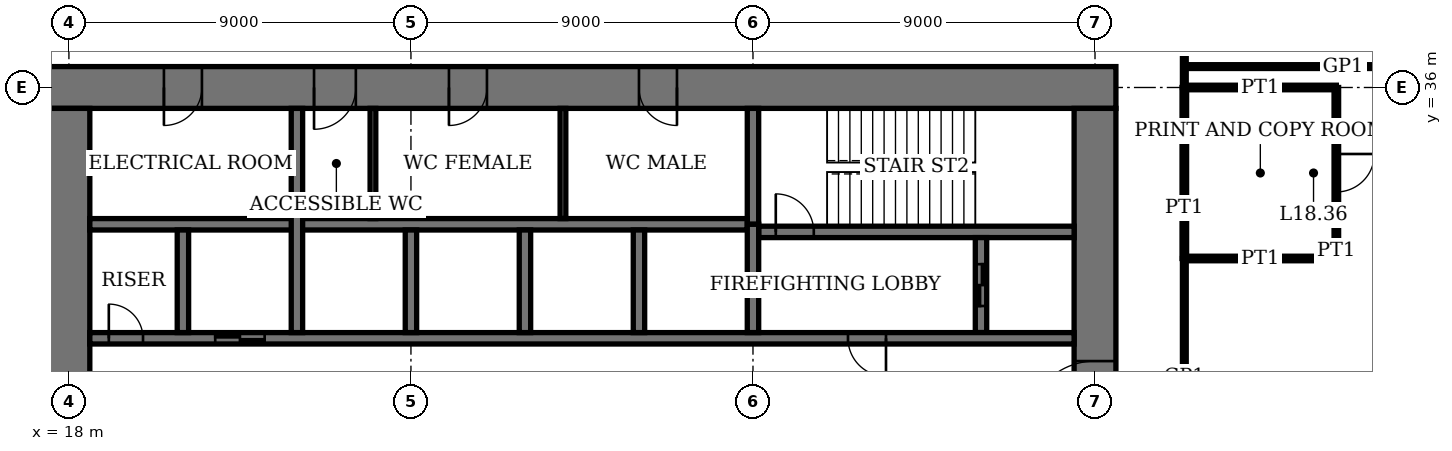
"""IFC4 building model, lengths in metres.
Left out: names, types, materials, properties, quantities, classifications, styles, units other than length and angle.
Written with IfcOpenShell. Run it as: python <this file> out.ifc"""

import sys

from ifc_helpers import new_model, si_unit, direction, frame, frame_2d, origin, place, context, subcontext, project, spatial, rectangle, extrude, element, fill, save


model = new_model("IFC4")
c1 = context("Model", 3, precision=1e-05, world=origin(), true_north=direction((0.0, 1.0)))
c2 = subcontext(c1, "Body", "Model", "MODEL_VIEW")
j1 = project(units=[si_unit("LENGTHUNIT", "METRE"), si_unit("PLANEANGLEUNIT", "RADIAN")], contexts=[c1])
p1 = place(None, origin())
s1 = spatial("IfcSite", under=j1, at=p1, CompositionType="ELEMENT")
p2 = place(p1, origin())
s2 = spatial("IfcBuilding", under=s1, at=p2, CompositionType="ELEMENT")
p3 = place(p2, frame((0.0, 0.0, 75.8)))
s3 = spatial("IfcBuildingStorey", under=s2, at=p3, CompositionType="ELEMENT", Elevation=75.8)
p4 = place(p3, frame((45.55, 36.0, 0.0), z_axis=(0.0, 0.0, 1.0), x_axis=(-1.0, 0.0, 0.0)))
e1 = element("IfcWall", 1, at=p4, inside=s3, PredefinedType="SHEAR", context=c2, shape_type="SweptSolid", body=[
    extrude(rectangle(XDim=28.1, YDim=1.1, at=frame_2d((14.05, 0.0))), origin(), (0.0, 0.0, 1.0), 4.2),
])
p5 = place(p4, frame((11.55, 0.0, 0.0)))
e2 = element("IfcOpeningElement", 2, at=p5, cuts=e1, PredefinedType="OPENING", context=c2, shape_type="SweptSolid", body=[
    extrude(rectangle(XDim=1.0, YDim=2.4, at=frame_2d((0.5, 1.2))), frame((0.0, 0.56, 0.0), z_axis=(0.0, -1.0, 0.0), x_axis=(1.0, 0.0, 0.0)), (0.0, 0.0, 1.0), 1.12),
])
p6 = place(p4, frame((16.55, 0.0, 0.0)))
e3 = element("IfcOpeningElement", 3, at=p6, cuts=e1, PredefinedType="OPENING", context=c2, shape_type="SweptSolid", body=[
    extrude(rectangle(XDim=1.0, YDim=2.4, at=frame_2d((0.5, 1.2))), frame((0.0, 0.56, 0.0), z_axis=(0.0, -1.0, 0.0), x_axis=(1.0, 0.0, 0.0)), (0.0, 0.0, 1.0), 1.12),
])
p7 = place(p4, frame((20.0, 0.0, 0.0)))
e4 = element("IfcOpeningElement", 4, at=p7, cuts=e1, PredefinedType="OPENING", context=c2, shape_type="SweptSolid", body=[
    extrude(rectangle(XDim=1.1, YDim=2.4, at=frame_2d((0.55, 1.2))), frame((0.0, 0.56, 0.0), z_axis=(0.0, -1.0, 0.0), x_axis=(1.0, 0.0, 0.0)), (0.0, 0.0, 1.0), 1.12),
])
p8 = place(p4, frame((24.05, 0.0, 0.0)))
e5 = element("IfcOpeningElement", 5, at=p8, cuts=e1, PredefinedType="OPENING", context=c2, shape_type="SweptSolid", body=[
    extrude(rectangle(XDim=1.0, YDim=2.4, at=frame_2d((0.5, 1.2))), frame((0.0, 0.56, 0.0), z_axis=(0.0, -1.0, 0.0), x_axis=(1.0, 0.0, 0.0)), (0.0, 0.0, 1.0), 1.12),
])
p9 = place(p3, frame((18.0, 35.45, 0.0), z_axis=(0.0, 0.0, 1.0), x_axis=(0.0, -1.0, 0.0)))
e6 = element("IfcWall", 6, at=p9, inside=s3, PredefinedType="SHEAR", context=c2, shape_type="SweptSolid", body=[
    extrude(rectangle(XDim=16.9, YDim=1.1, at=frame_2d((8.45, 0.0))), origin(), (0.0, 0.0, 1.0), 4.2),
])
p10 = place(p9, frame((8.45, 0.0, 0.0)))
e7 = element("IfcOpeningElement", 7, at=p10, cuts=e6, PredefinedType="OPENING", context=c2, shape_type="SweptSolid", body=[
    extrude(rectangle(XDim=1.8, YDim=2.4, at=frame_2d((0.9, 1.2))), frame((0.0, 0.56, 0.0), z_axis=(0.0, -1.0, 0.0), x_axis=(1.0, 0.0, 0.0)), (0.0, 0.0, 1.0), 1.12),
])
p11 = place(p3, frame((45.0, 18.55, 0.0), z_axis=(0.0, 0.0, 1.0), x_axis=(0.0, 1.0, 0.0)))
e8 = element("IfcWall", 8, at=p11, inside=s3, PredefinedType="SHEAR", context=c2, shape_type="SweptSolid", body=[
    extrude(rectangle(XDim=16.9, YDim=1.1, at=frame_2d((8.45, 0.0))), origin(), (0.0, 0.0, 1.0), 4.2),
])
p12 = place(p11, frame((8.45, 0.0, 0.0)))
e9 = element("IfcOpeningElement", 9, at=p12, cuts=e8, PredefinedType="OPENING", context=c2, shape_type="SweptSolid", body=[
    extrude(rectangle(XDim=1.8, YDim=2.4, at=frame_2d((0.9, 1.2))), frame((0.0, 0.56, 0.0), z_axis=(0.0, -1.0, 0.0), x_axis=(1.0, 0.0, 0.0)), (0.0, 0.0, 1.0), 1.12),
])
p13 = place(p3, frame((36.15, 32.2, 0.0), z_axis=(0.0, 0.0, 1.0), x_axis=(1.0, 0.0, 0.0)))
e10 = element("IfcWall", 10, at=p13, inside=s3, PredefinedType="SHEAR", context=c2, shape_type="SweptSolid", body=[
    extrude(rectangle(XDim=8.3, YDim=0.3, at=frame_2d((4.15, 0.0))), origin(), (0.0, 0.0, 1.0), 4.2),
])
p14 = place(p13, frame((0.45, 0.0, 0.0)))
e11 = element("IfcOpeningElement", 11, at=p14, cuts=e10, PredefinedType="OPENING", context=c2, shape_type="SweptSolid", body=[
    extrude(rectangle(XDim=1.0, YDim=2.4, at=frame_2d((0.5, 1.2))), frame((0.0, 0.16, 0.0), z_axis=(0.0, -1.0, 0.0), x_axis=(1.0, 0.0, 0.0)), (0.0, 0.0, 1.0), 0.32),
])
p15 = place(p3, frame((36.0, 32.4, 0.0), z_axis=(0.0, 0.0, 1.0), x_axis=(0.0, 1.0, 0.0)))
e12 = element("IfcWall", 12, at=p15, inside=s3, PredefinedType="SHEAR", context=c2, shape_type="SweptSolid", body=[
    extrude(rectangle(XDim=3.05, YDim=0.3, at=frame_2d((1.525, 0.0))), origin(), (0.0, 0.0, 1.0), 4.2),
])
p16 = place(p3, frame((42.0, 29.55, 0.0), z_axis=(0.0, 0.0, 1.0), x_axis=(0.0, 1.0, 0.0)))
e13 = element("IfcWall", 13, at=p16, inside=s3, PredefinedType="SHEAR", context=c2, shape_type="SweptSolid", body=[
    extrude(rectangle(XDim=2.5, YDim=0.3, at=frame_2d((1.25, 0.0))), origin(), (0.0, 0.0, 1.0), 4.2),
])
p17 = place(p16, frame((0.7, 0.0, 0.0)))
e14 = element("IfcOpeningElement", 14, at=p17, cuts=e13, PredefinedType="OPENING", context=c2, shape_type="SweptSolid", body=[
    extrude(rectangle(XDim=1.1, YDim=2.4, at=frame_2d((0.55, 1.2))), frame((0.0, 0.16, 0.0), z_axis=(0.0, -1.0, 0.0), x_axis=(1.0, 0.0, 0.0)), (0.0, 0.0, 1.0), 0.32),
])
p18 = place(p3, frame((18.55, 29.4, 0.0), z_axis=(0.0, 0.0, 1.0), x_axis=(1.0, 0.0, 0.0)))
e15 = element("IfcWall", 15, at=p18, inside=s3, PredefinedType="SHEAR", context=c2, shape_type="SweptSolid", body=[
    extrude(rectangle(XDim=25.9, YDim=0.3, at=frame_2d((12.95, 0.0))), origin(), (0.0, 0.0, 1.0), 4.2),
])
p19 = place(p18, frame((19.95, 0.0, 0.0)))
e16 = element("IfcOpeningElement", 16, at=p19, cuts=e15, PredefinedType="OPENING", context=c2, shape_type="SweptSolid", body=[
    extrude(rectangle(XDim=1.0, YDim=2.4, at=frame_2d((0.5, 1.2))), frame((0.0, 0.16, 0.0), z_axis=(0.0, -1.0, 0.0), x_axis=(1.0, 0.0, 0.0)), (0.0, 0.0, 1.0), 0.32),
])
p20 = place(p18, frame((0.5, 0.0, 0.0)))
e17 = element("IfcOpeningElement", 17, at=p20, cuts=e15, PredefinedType="OPENING", context=c2, shape_type="SweptSolid", body=[
    extrude(rectangle(XDim=0.9, YDim=2.1, at=frame_2d((0.45, 1.05))), frame((0.0, 0.16, 0.0), z_axis=(0.0, -1.0, 0.0), x_axis=(1.0, 0.0, 0.0)), (0.0, 0.0, 1.0), 0.32),
])
p21 = place(p18, frame((3.3, 0.0, 0.0)))
e18 = element("IfcOpeningElement", 18, at=p21, cuts=e15, PredefinedType="OPENING", context=c2, shape_type="SweptSolid", body=[
    extrude(rectangle(XDim=1.3, YDim=2.4, at=frame_2d((0.65, 1.2))), frame((0.0, 0.16, 0.0), z_axis=(0.0, -1.0, 0.0), x_axis=(1.0, 0.0, 0.0)), (0.0, 0.0, 1.0), 0.32),
])
p22 = place(p3, frame((18.55, 32.4, 0.0), z_axis=(0.0, 0.0, 1.0), x_axis=(1.0, 0.0, 0.0)))
e19 = element("IfcWall", 19, at=p22, inside=s3, PredefinedType="SHEAR", context=c2, shape_type="SweptSolid", body=[
    extrude(rectangle(XDim=17.3, YDim=0.3, at=frame_2d((8.65, 0.0))), origin(), (0.0, 0.0, 1.0), 4.2),
])
for number, where, z_axis, x_axis in (
    (20, (33.0, 29.55, 0.0), (0.0, 0.0, 1.0), (0.0, 1.0, 0.0)),
    (21, (30.0, 29.55, 0.0), (0.0, 0.0, 1.0), (0.0, 1.0, 0.0)),
    (22, (27.0, 29.55, 0.0), (0.0, 0.0, 1.0), (0.0, 1.0, 0.0)),
):
    element("IfcWall", number, at=place(p3, frame(where, z_axis=z_axis, x_axis=x_axis)), inside=s3, PredefinedType="SHEAR", context=c2, shape_type="SweptSolid", body=[
        extrude(rectangle(XDim=2.7, YDim=0.3, at=frame_2d((1.35, 0.0))), origin(), (0.0, 0.0, 1.0), 4.2),
    ])
p23 = place(p3, frame((24.0, 29.55, 0.0), z_axis=(0.0, 0.0, 1.0), x_axis=(0.0, 1.0, 0.0)))
e23 = element("IfcWall", 23, at=p23, inside=s3, PredefinedType="SHEAR", context=c2, shape_type="SweptSolid", body=[
    extrude(rectangle(XDim=5.9, YDim=0.3, at=frame_2d((2.95, 0.0))), origin(), (0.0, 0.0, 1.0), 4.2),
])
p24 = place(p3, frame((21.0, 29.55, 0.0), z_axis=(0.0, 0.0, 1.0), x_axis=(0.0, 1.0, 0.0)))
e24 = element("IfcWall", 24, at=p24, inside=s3, PredefinedType="SHEAR", context=c2, shape_type="SweptSolid", body=[
    extrude(rectangle(XDim=2.7, YDim=0.3, at=frame_2d((1.35, 0.0))), origin(), (0.0, 0.0, 1.0), 4.2),
])
p25 = place(p3, frame((36.0, 29.55, 0.0), z_axis=(0.0, 0.0, 1.0), x_axis=(0.0, 1.0, 0.0)))
e25 = element("IfcWall", 25, at=p25, inside=s3, PredefinedType="SHEAR", context=c2, shape_type="SweptSolid", body=[
    extrude(rectangle(XDim=2.85, YDim=0.3, at=frame_2d((1.425, 0.0))), origin(), (0.0, 0.0, 1.0), 4.2),
])
p26 = place(p3, frame((47.35, 31.5, 0.0), z_axis=(0.0, 0.0, 1.0), x_axis=(1.0, 0.0, 0.0)))
e26 = element("IfcWall", 26, at=p26, inside=s3, PredefinedType="PARTITIONING", context=c2, shape_type="SweptSolid", body=[
    extrude(rectangle(XDim=4.0, YDim=0.12, at=frame_2d((2.0, 0.0))), origin(), (0.0, 0.0, 1.0), 3.15),
])
p27 = place(p3, frame((47.35, 36.0, 0.0), z_axis=(0.0, 0.0, 1.0), x_axis=(1.0, 0.0, 0.0)))
e27 = element("IfcWall", 27, at=p27, inside=s3, PredefinedType="PARTITIONING", context=c2, shape_type="SweptSolid", body=[
    extrude(rectangle(XDim=4.0, YDim=0.12, at=frame_2d((2.0, 0.0))), origin(), (0.0, 0.0, 1.0), 3.25),
])
p28 = place(p3, frame((47.35, 36.55, 0.0), z_axis=(0.0, 0.0, 1.0), x_axis=(1.0, 0.0, 0.0)))
e28 = element("IfcWall", 28, at=p28, inside=s3, PredefinedType="PARTITIONING", context=c2, shape_type="SweptSolid", body=[
    extrude(rectangle(XDim=5.5, YDim=0.1, at=frame_2d((2.75, 0.0))), origin(), (0.0, 0.0, 1.0), 3.85),
])
p29 = place(p3, frame((47.35, 31.5, 0.0), z_axis=(0.0, 0.0, 1.0), x_axis=(0.0, 1.0, 0.0)))
e29 = element("IfcWall", 29, at=p29, inside=s3, PredefinedType="PARTITIONING", context=c2, shape_type="SweptSolid", body=[
    extrude(rectangle(XDim=4.5, YDim=0.12, at=frame_2d((2.25, 0.0))), origin(), (0.0, 0.0, 1.0), 3.85),
])
p30 = place(p3, frame((47.35, 15.65, 0.0), z_axis=(0.0, 0.0, 1.0), x_axis=(0.0, 1.0, 0.0)))
e30 = element("IfcWall", 30, at=p30, inside=s3, PredefinedType="PARTITIONING", context=c2, shape_type="SweptSolid", body=[
    extrude(rectangle(XDim=15.85, YDim=0.1, at=frame_2d((7.925, 0.0))), origin(), (0.0, 0.0, 1.0), 3.85),
])
p31 = place(p30, frame((7.425, 0.0, 0.0)))
e31 = element("IfcOpeningElement", 31, at=p31, cuts=e30, PredefinedType="OPENING", context=c2, shape_type="SweptSolid", body=[
    extrude(rectangle(XDim=1.0, YDim=2.4, at=frame_2d((0.5, 1.2))), frame((0.0, 0.06, 0.0), z_axis=(0.0, -1.0, 0.0), x_axis=(1.0, 0.0, 0.0)), (0.0, 0.0, 1.0), 0.12),
])
p32 = place(p3, frame((47.35, 36.0, 0.0), z_axis=(0.0, 0.0, 1.0), x_axis=(0.0, 1.0, 0.0)))
e32 = element("IfcWall", 32, at=p32, inside=s3, PredefinedType="PARTITIONING", context=c2, shape_type="SweptSolid", body=[
    extrude(rectangle(XDim=2.35, YDim=0.1, at=frame_2d((1.175, 0.0))), origin(), (0.0, 0.0, 1.0), 3.85),
])
p33 = place(p3, frame((51.35, 31.5, 0.0), z_axis=(0.0, 0.0, 1.0), x_axis=(0.0, 1.0, 0.0)))
e33 = element("IfcWall", 33, at=p33, inside=s3, PredefinedType="PARTITIONING", context=c2, shape_type="SweptSolid", body=[
    extrude(rectangle(XDim=4.5, YDim=0.12, at=frame_2d((2.25, 0.0))), origin(), (0.0, 0.0, 1.0), 3.85),
])
p34 = place(p33, frame((1.75, 0.0, 0.0)))
e34 = element("IfcOpeningElement", 34, at=p34, cuts=e33, PredefinedType="OPENING", context=c2, shape_type="SweptSolid", body=[
    extrude(rectangle(XDim=1.0, YDim=2.4, at=frame_2d((0.5, 1.2))), frame((0.0, 0.07, 0.0), z_axis=(0.0, -1.0, 0.0), x_axis=(1.0, 0.0, 0.0)), (0.0, 0.0, 1.0), 0.14),
])
for number, where, z_axis, x_axis in (
    (35, (31.0, 32.55, 0.0), (0.0, 0.0, 1.0), (0.0, 1.0, 0.0)),
    (36, (26.0, 32.55, 0.0), (0.0, 0.0, 1.0), (0.0, 1.0, 0.0)),
):
    element("IfcWall", number, at=place(p3, frame(where, z_axis=z_axis, x_axis=x_axis)), inside=s3, PredefinedType="PARTITIONING", context=c2, shape_type="SweptSolid", body=[
        extrude(rectangle(XDim=2.9, YDim=0.15, at=frame_2d((1.45, 0.0))), origin(), (0.0, 0.0, 1.0), 3.85),
    ])
p35 = place(p12, origin())
e37 = element("IfcDoor", 37, at=p35, inside=s3, OperationType="DOUBLE_DOOR_DOUBLE_SWING", PredefinedType="DOOR", context=c2, shape_type="SweptSolid", body=[
    extrude(rectangle(XDim=1.8, YDim=2.4, at=frame_2d((0.9, 1.2))), frame((0.0, 0.03, 0.0), z_axis=(0.0, -1.0, 0.0), x_axis=(1.0, 0.0, 0.0)), (0.0, 0.0, 1.0), 0.06),
    extrude(rectangle(XDim=0.04, YDim=2.4, at=frame_2d((0.02, 1.2))), frame((0.0, 0.55, 0.0), z_axis=(0.0, -1.0, 0.0), x_axis=(1.0, 0.0, 0.0)), (0.0, 0.0, 1.0), 1.1),
    extrude(rectangle(XDim=0.04, YDim=2.4, at=frame_2d((1.78, 1.2))), frame((0.0, 0.55, 0.0), z_axis=(0.0, -1.0, 0.0), x_axis=(1.0, 0.0, 0.0)), (0.0, 0.0, 1.0), 1.1),
    extrude(rectangle(XDim=1.8, YDim=0.04, at=frame_2d((0.9, 2.38))), frame((0.0, 0.55, 0.0), z_axis=(0.0, -1.0, 0.0), x_axis=(1.0, 0.0, 0.0)), (0.0, 0.0, 1.0), 1.1),
])
fill(e9, e37)
p36 = place(p5, origin())
e38 = element("IfcDoor", 38, at=p36, inside=s3, OperationType="SINGLE_SWING_RIGHT", PredefinedType="DOOR", context=c2, shape_type="SweptSolid", body=[
    extrude(rectangle(XDim=1.0, YDim=2.4, at=frame_2d((0.5, 1.2))), frame((0.0, 0.025, 0.0), z_axis=(0.0, -1.0, 0.0), x_axis=(1.0, 0.0, 0.0)), (0.0, 0.0, 1.0), 0.05),
    extrude(rectangle(XDim=0.04, YDim=2.4, at=frame_2d((0.02, 1.2))), frame((0.0, 0.4, 0.0), z_axis=(0.0, -1.0, 0.0), x_axis=(1.0, 0.0, 0.0)), (0.0, 0.0, 1.0), 0.8),
    extrude(rectangle(XDim=0.04, YDim=2.4, at=frame_2d((0.98, 1.2))), frame((0.0, 0.4, 0.0), z_axis=(0.0, -1.0, 0.0), x_axis=(1.0, 0.0, 0.0)), (0.0, 0.0, 1.0), 0.8),
    extrude(rectangle(XDim=1.0, YDim=0.04, at=frame_2d((0.5, 2.38))), frame((0.0, 0.4, 0.0), z_axis=(0.0, -1.0, 0.0), x_axis=(1.0, 0.0, 0.0)), (0.0, 0.0, 1.0), 0.8),
])
fill(e2, e38)
p37 = place(p6, origin())
e39 = element("IfcDoor", 39, at=p37, inside=s3, OperationType="SINGLE_SWING_LEFT", PredefinedType="DOOR", context=c2, shape_type="SweptSolid", body=[
    extrude(rectangle(XDim=1.0, YDim=2.4, at=frame_2d((0.5, 1.2))), frame((0.0, 0.025, 0.0), z_axis=(0.0, -1.0, 0.0), x_axis=(1.0, 0.0, 0.0)), (0.0, 0.0, 1.0), 0.05),
    extrude(rectangle(XDim=0.04, YDim=2.4, at=frame_2d((0.02, 1.2))), frame((0.0, 0.4, 0.0), z_axis=(0.0, -1.0, 0.0), x_axis=(1.0, 0.0, 0.0)), (0.0, 0.0, 1.0), 0.8),
    extrude(rectangle(XDim=0.04, YDim=2.4, at=frame_2d((0.98, 1.2))), frame((0.0, 0.4, 0.0), z_axis=(0.0, -1.0, 0.0), x_axis=(1.0, 0.0, 0.0)), (0.0, 0.0, 1.0), 0.8),
    extrude(rectangle(XDim=1.0, YDim=0.04, at=frame_2d((0.5, 2.38))), frame((0.0, 0.4, 0.0), z_axis=(0.0, -1.0, 0.0), x_axis=(1.0, 0.0, 0.0)), (0.0, 0.0, 1.0), 0.8),
])
fill(e3, e39)
p38 = place(p7, origin())
e40 = element("IfcDoor", 40, at=p38, inside=s3, OperationType="SINGLE_SWING_LEFT", PredefinedType="DOOR", context=c2, shape_type="SweptSolid", body=[
    extrude(rectangle(XDim=1.1, YDim=2.4, at=frame_2d((0.55, 1.2))), frame((0.0, 0.025, 0.0), z_axis=(0.0, -1.0, 0.0), x_axis=(1.0, 0.0, 0.0)), (0.0, 0.0, 1.0), 0.05),
    extrude(rectangle(XDim=0.04, YDim=2.4, at=frame_2d((0.02, 1.2))), frame((0.0, 0.44, 0.0), z_axis=(0.0, -1.0, 0.0), x_axis=(1.0, 0.0, 0.0)), (0.0, 0.0, 1.0), 0.88),
    extrude(rectangle(XDim=0.04, YDim=2.4, at=frame_2d((1.08, 1.2))), frame((0.0, 0.44, 0.0), z_axis=(0.0, -1.0, 0.0), x_axis=(1.0, 0.0, 0.0)), (0.0, 0.0, 1.0), 0.88),
    extrude(rectangle(XDim=1.1, YDim=0.04, at=frame_2d((0.55, 2.38))), frame((0.0, 0.44, 0.0), z_axis=(0.0, -1.0, 0.0), x_axis=(1.0, 0.0, 0.0)), (0.0, 0.0, 1.0), 0.88),
])
fill(e4, e40)
p39 = place(p8, origin())
e41 = element("IfcDoor", 41, at=p39, inside=s3, OperationType="SINGLE_SWING_LEFT", PredefinedType="DOOR", context=c2, shape_type="SweptSolid", body=[
    extrude(rectangle(XDim=1.0, YDim=2.4, at=frame_2d((0.5, 1.2))), frame((0.0, 0.025, 0.0), z_axis=(0.0, -1.0, 0.0), x_axis=(1.0, 0.0, 0.0)), (0.0, 0.0, 1.0), 0.05),
    extrude(rectangle(XDim=0.04, YDim=2.4, at=frame_2d((0.02, 1.2))), frame((0.0, 0.4, 0.0), z_axis=(0.0, -1.0, 0.0), x_axis=(1.0, 0.0, 0.0)), (0.0, 0.0, 1.0), 0.8),
    extrude(rectangle(XDim=0.04, YDim=2.4, at=frame_2d((0.98, 1.2))), frame((0.0, 0.4, 0.0), z_axis=(0.0, -1.0, 0.0), x_axis=(1.0, 0.0, 0.0)), (0.0, 0.0, 1.0), 0.8),
    extrude(rectangle(XDim=1.0, YDim=0.04, at=frame_2d((0.5, 2.38))), frame((0.0, 0.4, 0.0), z_axis=(0.0, -1.0, 0.0), x_axis=(1.0, 0.0, 0.0)), (0.0, 0.0, 1.0), 0.8),
])
fill(e5, e41)
p40 = place(p14, origin())
e42 = element("IfcDoor", 42, at=p40, inside=s3, OperationType="SINGLE_SWING_RIGHT", PredefinedType="DOOR", context=c2, shape_type="SweptSolid", body=[
    extrude(rectangle(XDim=1.0, YDim=2.4, at=frame_2d((0.5, 1.2))), frame((0.0, 0.03, 0.0), z_axis=(0.0, -1.0, 0.0), x_axis=(1.0, 0.0, 0.0)), (0.0, 0.0, 1.0), 0.06),
])
fill(e11, e42)
p41 = place(p19, origin())
e43 = element("IfcDoor", 43, at=p41, inside=s3, OperationType="SINGLE_SWING_RIGHT", PredefinedType="DOOR", context=c2, shape_type="SweptSolid", body=[
    extrude(rectangle(XDim=1.0, YDim=2.4, at=frame_2d((0.5, 1.2))), frame((0.0, 0.03, 0.0), z_axis=(0.0, -1.0, 0.0), x_axis=(1.0, 0.0, 0.0)), (0.0, 0.0, 1.0), 0.06),
])
fill(e16, e43)
p42 = place(p20, origin())
e44 = element("IfcDoor", 44, at=p42, inside=s3, OperationType="SINGLE_SWING_RIGHT", PredefinedType="DOOR", context=c2, shape_type="SweptSolid", body=[
    extrude(rectangle(XDim=0.9, YDim=2.1, at=frame_2d((0.45, 1.05))), frame((0.0, 0.03, 0.0), z_axis=(0.0, -1.0, 0.0), x_axis=(1.0, 0.0, 0.0)), (0.0, 0.0, 1.0), 0.06),
])
fill(e17, e44)
p43 = place(p34, origin())
e45 = element("IfcDoor", 45, at=p43, inside=s3, OperationType="SINGLE_SWING_RIGHT", PredefinedType="DOOR", context=c2, shape_type="SweptSolid", body=[
    extrude(rectangle(XDim=1.0, YDim=2.4, at=frame_2d((0.5, 1.2))), frame((0.0, 0.025, 0.0), z_axis=(0.0, -1.0, 0.0), x_axis=(1.0, 0.0, 0.0)), (0.0, 0.0, 1.0), 0.05),
])
fill(e34, e45)
p44 = place(p21, origin())
e46 = element("IfcDoor", 46, at=p44, inside=s3, OperationType="DOUBLE_DOOR_SLIDING", PredefinedType="DOOR", context=c2, shape_type="SweptSolid", body=[
    extrude(rectangle(XDim=1.3, YDim=2.4, at=frame_2d((0.65, 1.2))), frame((0.0, 0.02, 0.0), z_axis=(0.0, -1.0, 0.0), x_axis=(1.0, 0.0, 0.0)), (0.0, 0.0, 1.0), 0.04),
])
fill(e18, e46)
p45 = place(p17, origin())
e47 = element("IfcDoor", 47, at=p45, inside=s3, OperationType="DOUBLE_DOOR_SLIDING", PredefinedType="DOOR", context=c2, shape_type="SweptSolid", body=[
    extrude(rectangle(XDim=1.1, YDim=2.4, at=frame_2d((0.55, 1.2))), frame((0.0, 0.03, 0.0), z_axis=(0.0, -1.0, 0.0), x_axis=(1.0, 0.0, 0.0)), (0.0, 0.0, 1.0), 0.06),
])
fill(e14, e47)
save(model, sys.argv[1])
